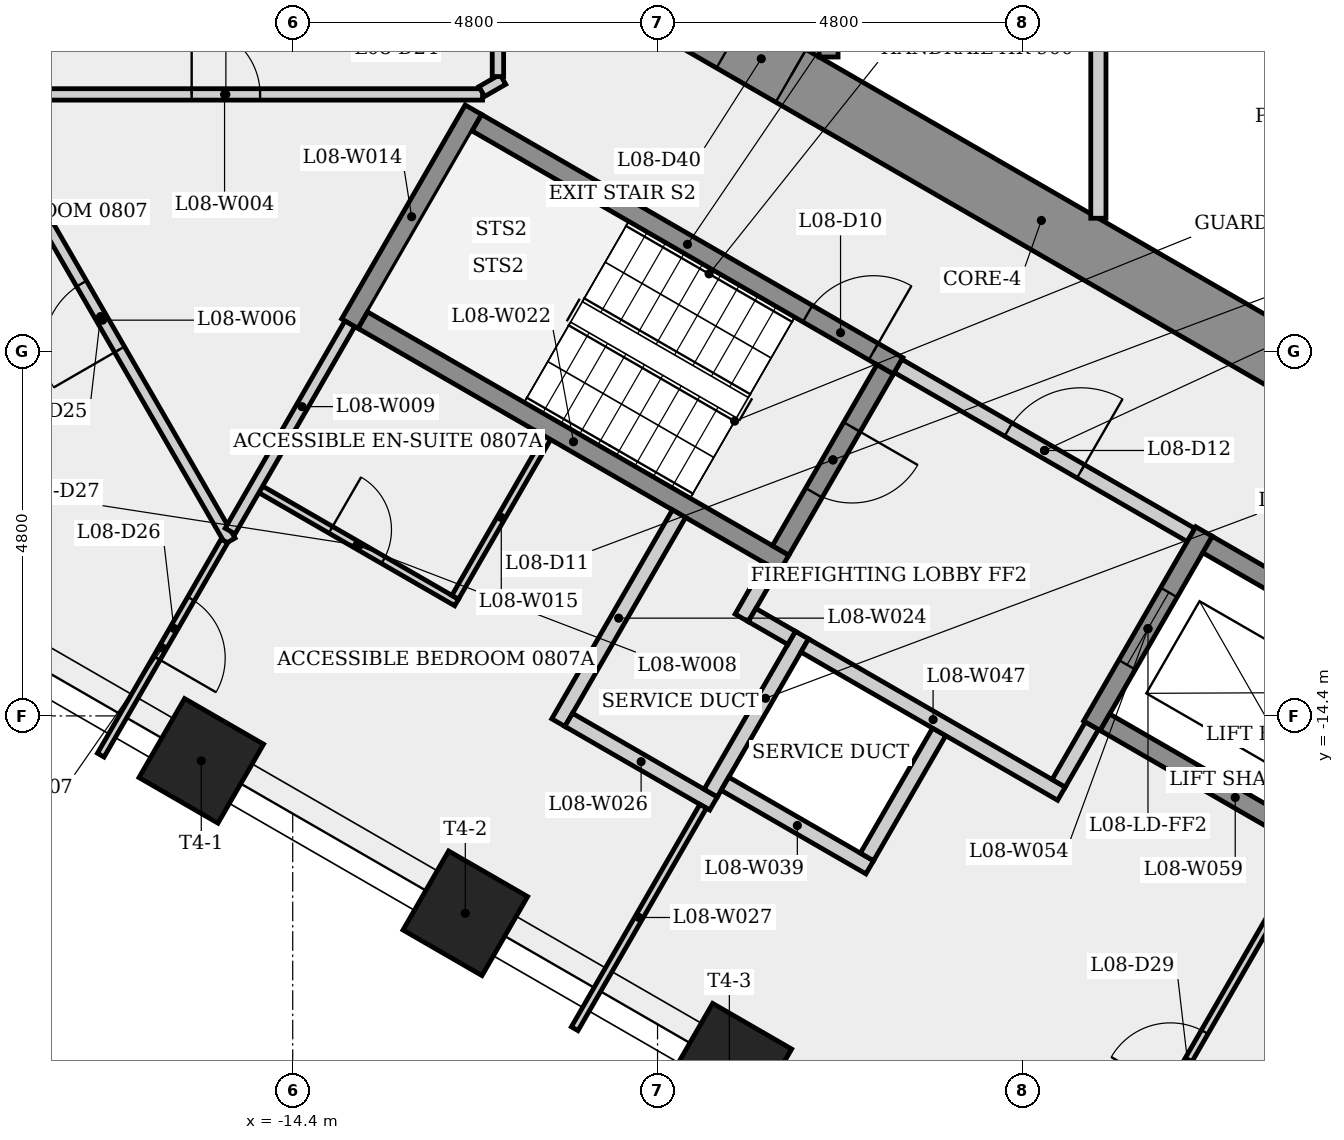
"""IFC4 building model, lengths in metres.
Left out: names, types, materials, properties, quantities, classifications, styles, units other than length and angle.
Written with IfcOpenShell. Run it as: python <this file> out.ifc"""

import sys

from ifc_helpers import new_model, si_unit, direction, frame, frame_2d, origin, origin_2d, place, context, subcontext, project, spatial, rectangle, extrude, element, fill, save


model = new_model("IFC4")
c1 = context("Model", 3, precision=1e-05, world=origin(), true_north=direction((0.0, 1.0)))
c2 = subcontext(c1, "Body", "Model", "MODEL_VIEW")
j1 = project(units=[si_unit("LENGTHUNIT", "METRE"), si_unit("PLANEANGLEUNIT", "RADIAN")], contexts=[c1])
p1 = place(None, origin())
s1 = spatial("IfcSite", under=j1, at=p1, CompositionType="ELEMENT")
p2 = place(p1, origin())
s2 = spatial("IfcBuilding", under=s1, at=p2, CompositionType="ELEMENT")
p3 = place(p2, frame((0.0, 0.0, 35.7)))
s3 = spatial("IfcBuildingStorey", under=s2, at=p3, CompositionType="ELEMENT", Elevation=35.7)
p4 = place(p3, frame((-9.3, -5.138, 0.0), z_axis=(0.0, 0.0, 1.0), x_axis=(0.866023993627, -0.500002442456, 0.0)))
e1 = element("IfcWall", 1, at=p4, inside=s3, PredefinedType="SHEAR", context=c2, shape_type="SweptSolid", body=[
    extrude(rectangle(XDim=10.97, YDim=0.8, at=frame_2d((5.485, 0.0))), origin(), (0.0, 0.0, 1.0), 3.4),
])
p5 = place(p4, frame((0.78, 0.0, 0.0)))
e2 = element("IfcOpeningElement", 2, at=p5, cuts=e1, PredefinedType="OPENING", context=c2, shape_type="SweptSolid", body=[
    extrude(rectangle(XDim=0.9, YDim=2.1, at=frame_2d((0.45, 1.05))), frame((0.0, 0.41, 0.0), z_axis=(0.0, -1.0, 0.0), x_axis=(1.0, 0.0, 0.0)), (0.0, 0.0, 1.0), 0.82),
])
for number, where, z_axis, x_axis in (
    (3, (-15.603, -14.991, 0.0), (0.0, 0.0, 1.0), (-0.5, -0.866, 0.0)),
    (4, (-12.129, -16.997, 0.0), (0.0, 0.0, 1.0), (-0.5, -0.866, 0.0)),
    (5, (-8.655, -19.003, 0.0), (0.0, 0.0, 1.0), (-0.5, -0.866, 0.0)),
):
    element("IfcColumn", number, at=place(p3, frame(where, z_axis=z_axis, x_axis=x_axis)), inside=s3, PredefinedType="COLUMN", context=c2, shape_type="SweptSolid", body=[
        extrude(rectangle(XDim=1.2, YDim=1.2, at=origin_2d()), origin(), (0.0, 0.0, 1.0), 3.4),
    ])
p6 = place(p3, frame((-18.691, -6.222, 0.0), z_axis=(0.0, 0.0, 1.0), x_axis=(1.0, 0.0, 0.0)))
e6 = element("IfcWall", 6, at=p6, inside=s3, PredefinedType="PARTITIONING", context=c2, shape_type="SweptSolid", body=[
    extrude(rectangle(XDim=6.788, YDim=0.15, at=frame_2d((3.394, 0.0))), origin(), (0.0, 0.0, 1.0), 3.05),
])
p7 = place(p6, frame((2.961, 0.0, 0.0)))
e7 = element("IfcOpeningElement", 7, at=p7, cuts=e6, PredefinedType="OPENING", context=c2, shape_type="SweptSolid", body=[
    extrude(rectangle(XDim=0.9, YDim=2.1, at=frame_2d((0.45, 1.05))), frame((0.0, 0.085, 0.0), z_axis=(0.0, -1.0, 0.0), x_axis=(1.0, 0.0, 0.0)), (0.0, 0.0, 1.0), 0.17),
])
p8 = place(p3, frame((-15.224, -12.098, 0.0), z_axis=(0.0, 0.0, 1.0), x_axis=(-0.499985979596, 0.866033498317, 0.0)))
e8 = element("IfcWall", 8, at=p8, inside=s3, PredefinedType="PARTITIONING", context=c2, shape_type="SweptSolid", body=[
    extrude(rectangle(XDim=6.71, YDim=0.15, at=frame_2d((3.355, 0.0))), origin(), (0.0, 0.0, 1.0), 3.05),
])
p9 = place(p8, frame((2.91, 0.0, 0.0)))
e9 = element("IfcOpeningElement", 9, at=p9, cuts=e8, PredefinedType="OPENING", context=c2, shape_type="SweptSolid", body=[
    extrude(rectangle(XDim=1.0, YDim=2.1, at=frame_2d((0.5, 1.05))), frame((0.0, 0.085, 0.0), z_axis=(0.0, -1.0, 0.0), x_axis=(1.0, 0.0, 0.0)), (0.0, 0.0, 1.0), 0.17),
])
p10 = place(p3, frame((-15.299, -12.098, 0.0), z_axis=(0.0, 0.0, 1.0), x_axis=(-0.50003633994, -0.866004421894, 0.0)))
e10 = element("IfcWall", 10, at=p10, inside=s3, PredefinedType="PARTITIONING", context=c2, shape_type="SweptSolid", body=[
    extrude(rectangle(XDim=3.254, YDim=0.1, at=frame_2d((1.627, 0.0))), origin(), (0.0, 0.0, 1.0), 3.05),
])
p11 = place(p10, frame((0.879, 0.0, 0.0)))
e11 = element("IfcOpeningElement", 11, at=p11, cuts=e10, PredefinedType="OPENING", context=c2, shape_type="SweptSolid", body=[
    extrude(rectangle(XDim=0.9, YDim=2.1, at=frame_2d((0.45, 1.05))), frame((0.0, 0.06, 0.0), z_axis=(0.0, -1.0, 0.0), x_axis=(1.0, 0.0, 0.0)), (0.0, 0.0, 1.0), 0.12),
])
p12 = place(p3, frame((-14.82, -11.42, 0.0), z_axis=(0.0, 0.0, 1.0), x_axis=(0.866017493347, -0.500013701029, 0.0)))
e12 = element("IfcWall", 12, at=p12, inside=s3, PredefinedType="PARTITIONING", context=c2, shape_type="SweptSolid", body=[
    extrude(rectangle(XDim=2.975, YDim=0.1, at=frame_2d((1.488, 0.0))), origin(), (0.0, 0.0, 1.0), 3.05),
])
p13 = place(p12, frame((1.062, 0.0, 0.0)))
e13 = element("IfcOpeningElement", 13, at=p13, cuts=e12, PredefinedType="OPENING", context=c2, shape_type="SweptSolid", body=[
    extrude(rectangle(XDim=0.8, YDim=2.1, at=frame_2d((0.4, 1.05))), frame((0.0, 0.06, 0.0), z_axis=(0.0, -1.0, 0.0), x_axis=(1.0, 0.0, 0.0)), (0.0, 0.0, 1.0), 0.12),
])
p14 = place(p3, frame((-15.224, -11.968, 0.0), z_axis=(0.0, 0.0, 1.0), x_axis=(0.500013012896, 0.866017890655, 0.0)))
e14 = element("IfcWall", 14, at=p14, inside=s3, PredefinedType="PARTITIONING", context=c2, shape_type="SweptSolid", body=[
    extrude(rectangle(XDim=3.152, YDim=0.15, at=frame_2d((1.576, 0.0))), origin(), (0.0, 0.0, 1.0), 3.05),
])
p15 = place(p3, frame((-13.648, -9.239, 0.0), z_axis=(0.0, 0.0, 1.0), x_axis=(0.500017246033, 0.866015446554, 0.0)))
e15 = element("IfcWall", 15, at=p15, inside=s3, PredefinedType="SHEAR", context=c2, shape_type="SweptSolid", body=[
    extrude(rectangle(XDim=3.25, YDim=0.25, at=frame_2d((1.625, 0.0))), origin(), (0.0, 0.0, 1.0), 3.05),
])
p16 = place(p3, frame((-12.262, -12.839, 0.0), z_axis=(0.0, 0.0, 1.0), x_axis=(0.499972286653, 0.866041403502, 0.0)))
e16 = element("IfcWall", 16, at=p16, inside=s3, PredefinedType="PARTITIONING", context=c2, shape_type="SweptSolid", body=[
    extrude(rectangle(XDim=2.425, YDim=0.1, at=frame_2d((1.212, 0.0))), origin(), (0.0, 0.0, 1.0), 3.05),
])
p17 = place(p3, frame((-11.977, -6.595, 0.0), z_axis=(0.0, 0.0, 1.0), x_axis=(0.866025499775, -0.499999833739, 0.0)))
e17 = element("IfcWall", 17, at=p17, inside=s3, PredefinedType="SHEAR", context=c2, shape_type="SweptSolid", body=[
    extrude(rectangle(XDim=6.4, YDim=0.25, at=frame_2d((3.2, 0.0))), origin(), (0.0, 0.0, 1.0), 3.05),
])
p18 = place(p17, frame((5.025, 0.0, 0.0)))
e18 = element("IfcOpeningElement", 18, at=p18, cuts=e17, PredefinedType="OPENING", context=c2, shape_type="SweptSolid", body=[
    extrude(rectangle(XDim=1.0, YDim=2.1, at=frame_2d((0.5, 1.05))), frame((0.0, 0.135, 0.0), z_axis=(0.0, -1.0, 0.0), x_axis=(1.0, 0.0, 0.0)), (0.0, 0.0, 1.0), 0.27),
])
p19 = place(p3, frame((-11.913, -6.185, 0.0), z_axis=(0.0, 0.0, 1.0), x_axis=(0.866172903102, 0.499744436618, 0.0)))
e19 = element("IfcWall", 19, at=p19, inside=s3, PredefinedType="PARTITIONING", context=c2, shape_type="SweptSolid", body=[
    extrude(rectangle(XDim=0.321, YDim=0.15, at=frame_2d((0.16, 0.0))), origin(), (0.0, 0.0, 1.0), 3.05),
])
p20 = place(p3, frame((-11.7, -5.987, 0.0), z_axis=(0.0, 0.0, 1.0), x_axis=(0.0, 1.0, 0.0)))
e20 = element("IfcWall", 20, at=p20, inside=s3, PredefinedType="PARTITIONING", context=c2, shape_type="SweptSolid", body=[
    extrude(rectangle(XDim=11.975, YDim=0.15, at=frame_2d((5.987, 0.0))), origin(), (0.0, 0.0, 1.0), 3.05),
])
p21 = place(p20, frame((7.459, 0.0, 0.0)))
e21 = element("IfcOpeningElement", 21, at=p21, cuts=e20, PredefinedType="OPENING", context=c2, shape_type="SweptSolid", body=[
    extrude(rectangle(XDim=1.0, YDim=2.1, at=frame_2d((0.5, 1.05))), frame((0.0, 0.085, 0.0), z_axis=(0.0, -1.0, 0.0), x_axis=(1.0, 0.0, 0.0)), (0.0, 0.0, 1.0), 0.17),
])
p22 = place(p3, frame((-13.477, -9.193, 0.0), z_axis=(0.0, 0.0, 1.0), x_axis=(0.866025499775, -0.499999833739, 0.0)))
e22 = element("IfcWall", 22, at=p22, inside=s3, PredefinedType="SHEAR", context=c2, shape_type="SweptSolid", body=[
    extrude(rectangle(XDim=6.4, YDim=0.25, at=frame_2d((3.2, 0.0))), origin(), (0.0, 0.0, 1.0), 3.05),
])
p23 = place(p3, frame((-10.905, -14.489, 0.0), z_axis=(0.0, 0.0, 1.0), x_axis=(0.499959856469, 0.866048579423, 0.0)))
e23 = element("IfcWall", 23, at=p23, inside=s3, PredefinedType="PLUMBINGWALL", context=c2, shape_type="SweptSolid", body=[
    extrude(rectangle(XDim=3.175, YDim=0.2, at=frame_2d((1.587, 0.0))), origin(), (0.0, 0.0, 1.0), 3.05),
])
p24 = place(p3, frame((-8.863, -15.552, 0.0), z_axis=(0.0, 0.0, 1.0), x_axis=(-0.866035918664, 0.499981787252, 0.0)))
e24 = element("IfcWall", 24, at=p24, inside=s3, PredefinedType="PLUMBINGWALL", context=c2, shape_type="SweptSolid", body=[
    extrude(rectangle(XDim=2.2, YDim=0.2, at=frame_2d((1.1, 0.0))), origin(), (0.0, 0.0, 1.0), 3.05),
])
p25 = place(p3, frame((-9.0, -15.588, 0.0), z_axis=(0.0, 0.0, 1.0), x_axis=(-0.499968344795, -0.866043679154, 0.0)))
e25 = element("IfcWall", 25, at=p25, inside=s3, PredefinedType="PARTITIONING", context=c2, shape_type="SweptSolid", body=[
    extrude(rectangle(XDim=3.381, YDim=0.1, at=frame_2d((1.69, 0.0))), origin(), (0.0, 0.0, 1.0), 3.05),
])
p26 = place(p3, frame((-8.493, -13.11, 0.0), z_axis=(0.0, 0.0, 1.0), x_axis=(0.500067724834, 0.865986299303, 0.0)))
e26 = element("IfcWall", 26, at=p26, inside=s3, PredefinedType="PLUMBINGWALL", context=c2, shape_type="SweptSolid", body=[
    extrude(rectangle(XDim=0.775, YDim=0.2, at=frame_2d((0.388, 0.0))), origin(), (0.0, 0.0, 1.0), 3.05),
])
p27 = place(p3, frame((-7.7, -13.337, 0.0), z_axis=(0.0, 0.0, 1.0), x_axis=(-0.500001309137, -0.866024647952, 0.0)))
e27 = element("IfcWall", 27, at=p27, inside=s3, PredefinedType="PLUMBINGWALL", context=c2, shape_type="SweptSolid", body=[
    extrude(rectangle(XDim=2.4, YDim=0.2, at=frame_2d((1.2, 0.0))), origin(), (0.0, 0.0, 1.0), 3.05),
])
p28 = place(p3, frame((-7.836, -13.373, 0.0), z_axis=(0.0, 0.0, 1.0), x_axis=(-0.866232998003, 0.499640263761, 0.0)))
e28 = element("IfcWall", 28, at=p28, inside=s3, PredefinedType="PLUMBINGWALL", context=c2, shape_type="SweptSolid", body=[
    extrude(rectangle(XDim=0.6, YDim=0.2, at=frame_2d((0.3, 0.0))), origin(), (0.0, 0.0, 1.0), 3.05),
])
p29 = place(p3, frame((-7.35, -5.73, 0.0), z_axis=(0.0, 0.0, 1.0), x_axis=(0.0, 1.0, 0.0)))
e29 = element("IfcWall", 29, at=p29, inside=s3, PredefinedType="SHEAR", context=c2, shape_type="SweptSolid", body=[
    extrude(rectangle(XDim=4.055, YDim=0.25, at=frame_2d((2.028, 0.0))), origin(), (0.0, 0.0, 1.0), 3.05),
])
p30 = place(p3, frame((-6.808, -16.392, 0.0), z_axis=(0.0, 0.0, 1.0), x_axis=(-0.866008176907, 0.50002983664, 0.0)))
e30 = element("IfcWall", 30, at=p30, inside=s3, PredefinedType="PLUMBINGWALL", context=c2, shape_type="SweptSolid", body=[
    extrude(rectangle(XDim=2.2, YDim=0.2, at=frame_2d((1.1, 0.0))), origin(), (0.0, 0.0, 1.0), 3.05),
])
p31 = place(p3, frame((-6.605, -9.841, 0.0), z_axis=(0.0, 0.0, 1.0), x_axis=(-0.499996545922, -0.866027397988, 0.0)))
e31 = element("IfcWall", 31, at=p31, inside=s3, PredefinedType="SHEAR", context=c2, shape_type="SweptSolid", body=[
    extrude(rectangle(XDim=2.75, YDim=0.25, at=frame_2d((1.375, 0.0))), origin(), (0.0, 0.0, 1.0), 3.05),
])
p32 = place(p31, frame((0.875, 0.0, 0.0)))
e32 = element("IfcOpeningElement", 32, at=p32, cuts=e31, PredefinedType="OPENING", context=c2, shape_type="SweptSolid", body=[
    extrude(rectangle(XDim=1.0, YDim=2.1, at=frame_2d((0.5, 1.05))), frame((0.0, 0.135, 0.0), z_axis=(0.0, -1.0, 0.0), x_axis=(1.0, 0.0, 0.0)), (0.0, 0.0, 1.0), 0.27),
])
p33 = place(p3, frame((-6.435, -9.795, 0.0), z_axis=(0.0, 0.0, 1.0), x_axis=(0.866012907634, -0.500021643343, 0.0)))
e33 = element("IfcWall", 33, at=p33, inside=s3, PredefinedType="PARTITIONING", context=c2, shape_type="SweptSolid", body=[
    extrude(rectangle(XDim=4.45, YDim=0.2, at=frame_2d((2.225, 0.0))), origin(), (0.0, 0.0, 1.0), 3.05),
])
p34 = place(p33, frame((1.675, 0.0, 0.0)))
e34 = element("IfcOpeningElement", 34, at=p34, cuts=e33, PredefinedType="OPENING", context=c2, shape_type="SweptSolid", body=[
    extrude(rectangle(XDim=1.1, YDim=2.1, at=frame_2d((0.55, 1.05))), frame((0.0, 0.11, 0.0), z_axis=(0.0, -1.0, 0.0), x_axis=(1.0, 0.0, 0.0)), (0.0, 0.0, 1.0), 0.22),
])
p35 = place(p3, frame((-5.895, -14.61, 0.0), z_axis=(0.0, 0.0, 1.0), x_axis=(-0.500022797313, -0.86601224135, 0.0)))
e35 = element("IfcWall", 35, at=p35, inside=s3, PredefinedType="PLUMBINGWALL", context=c2, shape_type="SweptSolid", body=[
    extrude(rectangle(XDim=1.9, YDim=0.2, at=frame_2d((0.95, 0.0))), origin(), (0.0, 0.0, 1.0), 3.05),
])
p36 = place(p3, frame((-4.286, -15.423, 0.0), z_axis=(0.0, 0.0, 1.0), x_axis=(-0.866042777325, 0.499969906938, 0.0)))
e36 = element("IfcWall", 36, at=p36, inside=s3, PredefinedType="PARTITIONING", context=c2, shape_type="SweptSolid", body=[
    extrude(rectangle(XDim=3.9, YDim=0.2, at=frame_2d((1.95, 0.0))), origin(), (0.0, 0.0, 1.0), 3.05),
])
p37 = place(p3, frame((-4.455, -22.116, 0.0), z_axis=(0.0, 0.0, 1.0), x_axis=(0.500004517121, 0.866022795808, 0.0)))
e37 = element("IfcWall", 37, at=p37, inside=s3, PredefinedType="PARTITIONING", context=c2, shape_type="SweptSolid", body=[
    extrude(rectangle(XDim=6.718, YDim=0.1, at=frame_2d((3.359, 0.0))), origin(), (0.0, 0.0, 1.0), 3.05),
])
p38 = place(p37, frame((3.207, 0.0, 0.0)))
e38 = element("IfcOpeningElement", 38, at=p38, cuts=e37, PredefinedType="OPENING", context=c2, shape_type="SweptSolid", body=[
    extrude(rectangle(XDim=0.9, YDim=2.1, at=frame_2d((0.45, 1.05))), frame((0.0, 0.06, 0.0), z_axis=(0.0, -1.0, 0.0), x_axis=(1.0, 0.0, 0.0)), (0.0, 0.0, 1.0), 0.12),
])
p39 = place(p3, frame((-3.885, -14.529, 0.0), z_axis=(0.0, 0.0, 1.0), x_axis=(-0.499859285417, -0.866106630146, 0.0)))
e39 = element("IfcWall", 39, at=p39, inside=s3, PredefinedType="PARTITIONING", context=c2, shape_type="SweptSolid", body=[
    extrude(rectangle(XDim=0.875, YDim=0.2, at=frame_2d((0.438, 0.0))), origin(), (0.0, 0.0, 1.0), 3.05),
])
p40 = place(p3, frame((-3.8, -5.275, 0.0), z_axis=(0.0, 0.0, 1.0), x_axis=(0.0, -1.0, 0.0)))
e40 = element("IfcWall", 40, at=p40, inside=s3, PredefinedType="PARTITIONING", context=c2, shape_type="SweptSolid", body=[
    extrude(rectangle(XDim=2.577, YDim=0.2, at=frame_2d((1.289, 0.0))), origin(), (0.0, 0.0, 1.0), 3.05),
])
p41 = place(p3, frame((-2.41, -11.974, 0.0), z_axis=(0.0, 0.0, 1.0), x_axis=(-0.500001826776, -0.866024349092, 0.0)))
e41 = element("IfcWall", 41, at=p41, inside=s3, PredefinedType="SHEAR", context=c2, shape_type="SweptSolid", body=[
    extrude(rectangle(XDim=2.95, YDim=0.25, at=frame_2d((1.475, 0.0))), origin(), (0.0, 0.0, 1.0), 3.05),
])
p42 = place(p41, frame((0.925, 0.0, 0.0)))
e42 = element("IfcOpeningElement", 42, at=p42, cuts=e41, PredefinedType="OPENING", context=c2, shape_type="SweptSolid", body=[
    extrude(rectangle(XDim=1.1, YDim=2.1, at=frame_2d((0.55, 1.05))), frame((0.0, 0.135, 0.0), z_axis=(0.0, -1.0, 0.0), x_axis=(1.0, 0.0, 0.0)), (0.0, 0.0, 1.0), 0.27),
])
p43 = place(p3, frame((-2.364, -12.145, 0.0), z_axis=(0.0, 0.0, 1.0), x_axis=(0.86603892542, -0.499976579108, 0.0)))
e43 = element("IfcWall", 43, at=p43, inside=s3, PredefinedType="SHEAR", context=c2, shape_type="SweptSolid", body=[
    extrude(rectangle(XDim=2.162, YDim=0.25, at=frame_2d((1.081, 0.0))), origin(), (0.0, 0.0, 1.0), 3.05),
])
p44 = place(p3, frame((-0.856, -16.133, 0.0), z_axis=(0.0, 0.0, 1.0), x_axis=(-0.866021716278, 0.500006386895, 0.0)))
e44 = element("IfcWall", 44, at=p44, inside=s3, PredefinedType="SHEAR", context=c2, shape_type="SweptSolid", body=[
    extrude(rectangle(XDim=3.3, YDim=0.25, at=frame_2d((1.65, 0.0))), origin(), (0.0, 0.0, 1.0), 3.05),
])
p45 = place(p18, origin())
e45 = element("IfcDoor", 45, at=p45, inside=s3, OperationType="SINGLE_SWING_RIGHT", PredefinedType="DOOR", context=c2, shape_type="SweptSolid", body=[
    extrude(rectangle(XDim=1.0, YDim=2.1, at=frame_2d((0.5, 1.05))), frame((0.0, 0.025, 0.0), z_axis=(0.0, -1.0, 0.0), x_axis=(1.0, 0.0, 0.0)), (0.0, 0.0, 1.0), 0.05),
])
fill(e18, e45)
p46 = place(p32, origin())
e46 = element("IfcDoor", 46, at=p46, inside=s3, OperationType="SINGLE_SWING_LEFT", PredefinedType="DOOR", context=c2, shape_type="SweptSolid", body=[
    extrude(rectangle(XDim=1.0, YDim=2.1, at=frame_2d((0.5, 1.05))), frame((0.0, 0.025, 0.0), z_axis=(0.0, -1.0, 0.0), x_axis=(1.0, 0.0, 0.0)), (0.0, 0.0, 1.0), 0.05),
])
fill(e32, e46)
p47 = place(p34, origin())
e47 = element("IfcDoor", 47, at=p47, inside=s3, OperationType="SINGLE_SWING_RIGHT", PredefinedType="DOOR", context=c2, shape_type="SweptSolid", body=[
    extrude(rectangle(XDim=1.1, YDim=2.1, at=frame_2d((0.55, 1.05))), frame((0.0, 0.025, 0.0), z_axis=(0.0, -1.0, 0.0), x_axis=(1.0, 0.0, 0.0)), (0.0, 0.0, 1.0), 0.05),
])
fill(e34, e47)
p48 = place(p42, origin())
e48 = element("IfcDoor", 48, at=p48, inside=s3, OperationType="SLIDING_TO_LEFT", PredefinedType="DOOR", context=c2, shape_type="SweptSolid", body=[
    extrude(rectangle(XDim=1.1, YDim=2.1, at=frame_2d((0.55, 1.05))), frame((0.0, 0.025, 0.0), z_axis=(0.0, -1.0, 0.0), x_axis=(1.0, 0.0, 0.0)), (0.0, 0.0, 1.0), 0.05),
])
fill(e42, e48)
p49 = place(p7, origin())
e49 = element("IfcDoor", 49, at=p49, inside=s3, OperationType="SINGLE_SWING_LEFT", PredefinedType="DOOR", context=c2, shape_type="SweptSolid", body=[
    extrude(rectangle(XDim=0.9, YDim=2.1, at=frame_2d((0.45, 1.05))), frame((0.0, 0.025, 0.0), z_axis=(0.0, -1.0, 0.0), x_axis=(1.0, 0.0, 0.0)), (0.0, 0.0, 1.0), 0.05),
])
fill(e7, e49)
p50 = place(p9, origin())
e50 = element("IfcDoor", 50, at=p50, inside=s3, OperationType="SINGLE_SWING_LEFT", PredefinedType="DOOR", context=c2, shape_type="SweptSolid", body=[
    extrude(rectangle(XDim=1.0, YDim=2.1, at=frame_2d((0.5, 1.05))), frame((0.0, 0.025, 0.0), z_axis=(0.0, -1.0, 0.0), x_axis=(1.0, 0.0, 0.0)), (0.0, 0.0, 1.0), 0.05),
])
fill(e9, e50)
p51 = place(p11, origin())
e51 = element("IfcDoor", 51, at=p51, inside=s3, OperationType="SINGLE_SWING_RIGHT", PredefinedType="DOOR", context=c2, shape_type="SweptSolid", body=[
    extrude(rectangle(XDim=0.9, YDim=2.1, at=frame_2d((0.45, 1.05))), frame((0.0, 0.025, 0.0), z_axis=(0.0, -1.0, 0.0), x_axis=(1.0, 0.0, 0.0)), (0.0, 0.0, 1.0), 0.05),
])
fill(e11, e51)
p52 = place(p13, origin())
e52 = element("IfcDoor", 52, at=p52, inside=s3, OperationType="SINGLE_SWING_LEFT", PredefinedType="DOOR", context=c2, shape_type="SweptSolid", body=[
    extrude(rectangle(XDim=0.8, YDim=2.1, at=frame_2d((0.4, 1.05))), frame((0.0, 0.025, 0.0), z_axis=(0.0, -1.0, 0.0), x_axis=(1.0, 0.0, 0.0)), (0.0, 0.0, 1.0), 0.05),
])
fill(e13, e52)
p53 = place(p38, origin())
e53 = element("IfcDoor", 53, at=p53, inside=s3, OperationType="SINGLE_SWING_LEFT", PredefinedType="DOOR", context=c2, shape_type="SweptSolid", body=[
    extrude(rectangle(XDim=0.9, YDim=2.1, at=frame_2d((0.45, 1.05))), frame((0.0, 0.025, 0.0), z_axis=(0.0, -1.0, 0.0), x_axis=(1.0, 0.0, 0.0)), (0.0, 0.0, 1.0), 0.05),
])
fill(e38, e53)
p54 = place(p5, origin())
e54 = element("IfcDoor", 54, at=p54, inside=s3, OperationType="SINGLE_SWING_RIGHT", PredefinedType="DOOR", context=c2, shape_type="SweptSolid", body=[
    extrude(rectangle(XDim=0.9, YDim=2.1, at=frame_2d((0.45, 1.05))), frame((0.0, 0.025, 0.0), z_axis=(0.0, -1.0, 0.0), x_axis=(1.0, 0.0, 0.0)), (0.0, 0.0, 1.0), 0.05),
])
fill(e2, e54)
save(model, sys.argv[1])
